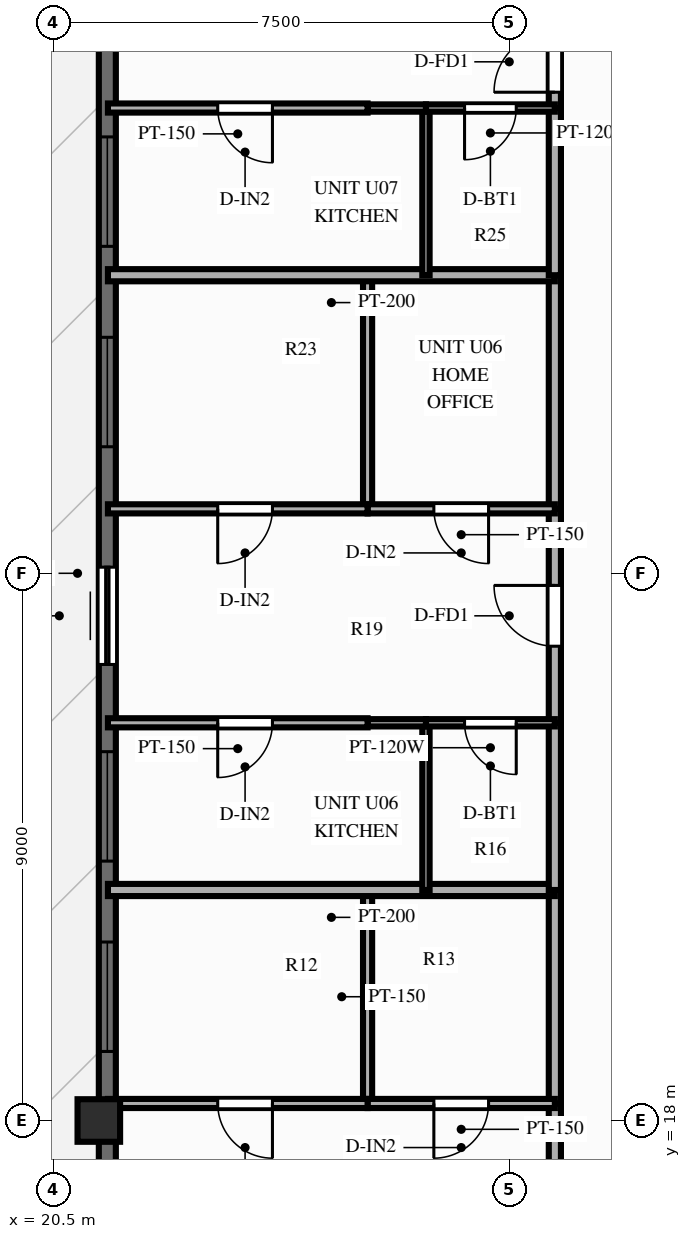
"""IFC4 building model, lengths in metres.
Left out: names, types, materials, properties, quantities, classifications, styles, units other than length and angle.
Written with IfcOpenShell. Run it as: python <this file> out.ifc"""

import sys

from ifc_helpers import new_model, si_unit, direction, frame, frame_2d, origin, origin_2d, place, context, subcontext, project, spatial, rectangle, extrude, source, transform, mapped, element, fill, save


model = new_model("IFC4")
c1 = context("Model", 3, precision=1e-05, world=origin(), true_north=direction((0.0, 1.0)))
c2 = subcontext(c1, "Body", "Model", "MODEL_VIEW")
j1 = project(units=[si_unit("LENGTHUNIT", "METRE"), si_unit("PLANEANGLEUNIT", "RADIAN")], contexts=[c1])
p1 = place(None, origin())
s1 = spatial("IfcSite", under=j1, at=p1, CompositionType="ELEMENT")
p2 = place(p1, origin())
s2 = spatial("IfcBuilding", under=s1, at=p2, CompositionType="ELEMENT")
p3 = place(p2, frame((0.0, 0.0, 226.2)))
s3 = spatial("IfcBuildingStorey", under=s2, at=p3, CompositionType="ELEMENT", Elevation=226.2)
m1 = source(origin(), c2, "Body", "SweptSolid", [
    extrude(rectangle(XDim=0.7, YDim=0.7, at=origin_2d()), origin(), (0.0, 0.0, 1.0), 3.9),
])
p4 = place(p3, frame((21.25, 18.0, 0.0), z_axis=(0.0, 0.0, 1.0), x_axis=(1.0, 0.0, 0.0)))
e1 = element("IfcColumn", 1, at=p4, inside=s3, PredefinedType="COLUMN", context=c2, shape_type="MappedRepresentation", body=[
    mapped(m1, transform((0.0, 0.0, 0.0), scale=1.0)),
])
p5 = place(p3, frame((21.39, 11.5, 0.0), z_axis=(0.0, 0.0, 1.0), x_axis=(0.0, 1.0, 0.0)))
e2 = element("IfcWall", 2, at=p5, inside=s3, PredefinedType="SOLIDWALL", context=c2, shape_type="SweptSolid", body=[
    extrude(rectangle(XDim=31.0, YDim=0.28, at=frame_2d((15.5, 0.0))), origin(), (0.0, 0.0, 1.0), 2.79),
])
p6 = place(p5, frame((0.66, 0.0, 0.85)))
e3 = element("IfcOpeningElement", 3, at=p6, cuts=e2, PredefinedType="OPENING", context=c2, shape_type="SweptSolid", body=[
    extrude(rectangle(XDim=1.8, YDim=1.65, at=frame_2d((0.9, 0.825))), frame((0.0, 0.152, 0.0), z_axis=(0.0, -1.0, 0.0), x_axis=(1.0, 0.0, 0.0)), (0.0, 0.0, 1.0), 0.304),
])
p7 = place(p5, frame((3.72, 0.0, 0.85)))
e4 = element("IfcOpeningElement", 4, at=p7, cuts=e2, PredefinedType="OPENING", context=c2, shape_type="SweptSolid", body=[
    extrude(rectangle(XDim=1.8, YDim=1.65, at=frame_2d((0.9, 0.825))), frame((0.0, 0.152, 0.0), z_axis=(0.0, -1.0, 0.0), x_axis=(1.0, 0.0, 0.0)), (0.0, 0.0, 1.0), 0.304),
])
p8 = place(p5, frame((7.635, 0.0, 0.85)))
e5 = element("IfcOpeningElement", 5, at=p8, cuts=e2, PredefinedType="OPENING", context=c2, shape_type="SweptSolid", body=[
    extrude(rectangle(XDim=1.8, YDim=1.65, at=frame_2d((0.9, 0.825))), frame((0.0, 0.152, 0.0), z_axis=(0.0, -1.0, 0.0), x_axis=(1.0, 0.0, 0.0)), (0.0, 0.0, 1.0), 0.304),
])
p9 = place(p5, frame((10.766, 0.0, 0.85)))
e6 = element("IfcOpeningElement", 6, at=p9, cuts=e2, PredefinedType="OPENING", context=c2, shape_type="SweptSolid", body=[
    extrude(rectangle(XDim=1.8, YDim=1.65, at=frame_2d((0.9, 0.825))), frame((0.0, 0.152, 0.0), z_axis=(0.0, -1.0, 0.0), x_axis=(1.0, 0.0, 0.0)), (0.0, 0.0, 1.0), 0.304),
])
p10 = place(p5, frame((14.0, 0.0, 0.0)))
e7 = element("IfcOpeningElement", 7, at=p10, cuts=e2, PredefinedType="OPENING", context=c2, shape_type="SweptSolid", body=[
    extrude(rectangle(XDim=1.6, YDim=2.15, at=frame_2d((0.8, 1.075))), frame((0.0, 0.152, 0.0), z_axis=(0.0, -1.0, 0.0), x_axis=(1.0, 0.0, 0.0)), (0.0, 0.0, 1.0), 0.304),
])
p11 = place(p5, frame((17.581, 0.0, 0.85)))
e8 = element("IfcOpeningElement", 8, at=p11, cuts=e2, PredefinedType="OPENING", context=c2, shape_type="SweptSolid", body=[
    extrude(rectangle(XDim=1.8, YDim=1.65, at=frame_2d((0.9, 0.825))), frame((0.0, 0.152, 0.0), z_axis=(0.0, -1.0, 0.0), x_axis=(1.0, 0.0, 0.0)), (0.0, 0.0, 1.0), 0.304),
])
p12 = place(p5, frame((20.877, 0.0, 0.85)))
e9 = element("IfcOpeningElement", 9, at=p12, cuts=e2, PredefinedType="OPENING", context=c2, shape_type="SweptSolid", body=[
    extrude(rectangle(XDim=1.8, YDim=1.65, at=frame_2d((0.9, 0.825))), frame((0.0, 0.152, 0.0), z_axis=(0.0, -1.0, 0.0), x_axis=(1.0, 0.0, 0.0)), (0.0, 0.0, 1.0), 0.304),
])
p13 = place(p5, frame((25.176, 0.0, 0.85)))
e10 = element("IfcOpeningElement", 10, at=p13, cuts=e2, PredefinedType="OPENING", context=c2, shape_type="SweptSolid", body=[
    extrude(rectangle(XDim=1.2, YDim=1.5, at=frame_2d((0.6, 0.75))), frame((0.0, 0.152, 0.0), z_axis=(0.0, -1.0, 0.0), x_axis=(1.0, 0.0, 0.0)), (0.0, 0.0, 1.0), 0.304),
])
p14 = place(p5, frame((27.936, 0.0, 0.85)))
e11 = element("IfcOpeningElement", 11, at=p14, cuts=e2, PredefinedType="OPENING", context=c2, shape_type="SweptSolid", body=[
    extrude(rectangle(XDim=1.8, YDim=1.65, at=frame_2d((0.9, 0.825))), frame((0.0, 0.152, 0.0), z_axis=(0.0, -1.0, 0.0), x_axis=(1.0, 0.0, 0.0)), (0.0, 0.0, 1.0), 0.304),
])
p15 = place(p3, frame((28.75, 14.43, 0.0), z_axis=(0.0, 0.0, 1.0), x_axis=(0.0, 1.0, 0.0)))
e12 = element("IfcWall", 12, at=p15, inside=s3, PredefinedType="PARTITIONING", context=c2, shape_type="SweptSolid", body=[
    extrude(rectangle(XDim=3.85, YDim=0.2, at=frame_2d((1.925, 0.0))), origin(), (0.0, 0.0, 1.0), 3.69),
])
p16 = place(p15, frame((1.425, 0.0, 0.0)))
e13 = element("IfcOpeningElement", 13, at=p16, cuts=e12, PredefinedType="OPENING", context=c2, shape_type="SweptSolid", body=[
    extrude(rectangle(XDim=1.0, YDim=2.15, at=frame_2d((0.5, 1.075))), frame((0.0, 0.112, 0.0), z_axis=(0.0, -1.0, 0.0), x_axis=(1.0, 0.0, 0.0)), (0.0, 0.0, 1.0), 0.224),
])
p17 = place(p3, frame((28.75, 18.28, 0.0), z_axis=(0.0, 0.0, 1.0), x_axis=(0.0, 1.0, 0.0)))
e14 = element("IfcWall", 14, at=p17, inside=s3, PredefinedType="PARTITIONING", context=c2, shape_type="SweptSolid", body=[
    extrude(rectangle(XDim=3.511, YDim=0.2, at=frame_2d((1.756, 0.0))), origin(), (0.0, 0.0, 1.0), 3.69),
])
p18 = place(p3, frame((25.67, 18.28, 0.0), z_axis=(0.0, 0.0, 1.0), x_axis=(0.0, 1.0, 0.0)))
e15 = element("IfcWall", 15, at=p18, inside=s3, PredefinedType="PARTITIONING", context=c2, shape_type="SweptSolid", body=[
    extrude(rectangle(XDim=3.511, YDim=0.15, at=frame_2d((1.756, 0.0))), origin(), (0.0, 0.0, 1.0), 3.39),
])
p19 = place(p3, frame((28.75, 18.28, 0.0), z_axis=(0.0, 0.0, 1.0), x_axis=(-1.0, 0.0, 0.0)))
e16 = element("IfcWall", 16, at=p19, inside=s3, PredefinedType="PARTITIONING", context=c2, shape_type="SweptSolid", body=[
    extrude(rectangle(XDim=3.08, YDim=0.15, at=frame_2d((1.54, 0.0))), origin(), (0.0, 0.0, 1.0), 3.69),
])
p20 = place(p19, frame((1.09, 0.0, 0.0)))
e17 = element("IfcOpeningElement", 17, at=p20, cuts=e16, PredefinedType="OPENING", context=c2, shape_type="SweptSolid", body=[
    extrude(rectangle(XDim=0.9, YDim=2.1, at=frame_2d((0.45, 1.05))), frame((0.0, 0.087, 0.0), z_axis=(0.0, -1.0, 0.0), x_axis=(1.0, 0.0, 0.0)), (0.0, 0.0, 1.0), 0.174),
])
p21 = place(p3, frame((25.67, 18.28, 0.0), z_axis=(0.0, 0.0, 1.0), x_axis=(-1.0, 0.0, 0.0)))
e18 = element("IfcWall", 18, at=p21, inside=s3, PredefinedType="PARTITIONING", context=c2, shape_type="SweptSolid", body=[
    extrude(rectangle(XDim=4.27, YDim=0.15, at=frame_2d((2.135, 0.0))), origin(), (0.0, 0.0, 1.0), 3.69),
])
p22 = place(p21, frame((1.565, 0.0, 0.0)))
e19 = element("IfcOpeningElement", 19, at=p22, cuts=e18, PredefinedType="OPENING", context=c2, shape_type="SweptSolid", body=[
    extrude(rectangle(XDim=0.9, YDim=2.1, at=frame_2d((0.45, 1.05))), frame((0.0, 0.087, 0.0), z_axis=(0.0, -1.0, 0.0), x_axis=(1.0, 0.0, 0.0)), (0.0, 0.0, 1.0), 0.174),
])
p23 = place(p3, frame((28.75, 21.791, 0.0), z_axis=(0.0, 0.0, 1.0), x_axis=(-1.0, 0.0, 0.0)))
e20 = element("IfcWall", 20, at=p23, inside=s3, PredefinedType="PARTITIONING", context=c2, shape_type="SweptSolid", body=[
    extrude(rectangle(XDim=7.35, YDim=0.2, at=frame_2d((3.675, 0.0))), origin(), (0.0, 0.0, 1.0), 3.29),
])
p24 = place(p3, frame((28.75, 21.791, 0.0), z_axis=(0.0, 0.0, 1.0), x_axis=(0.0, 1.0, 0.0)))
e21 = element("IfcWall", 21, at=p24, inside=s3, PredefinedType="PARTITIONING", context=c2, shape_type="SweptSolid", body=[
    extrude(rectangle(XDim=2.75, YDim=0.2, at=frame_2d((1.375, 0.0))), origin(), (0.0, 0.0, 1.0), 3.69),
])
p25 = place(p3, frame((28.75, 24.541, 0.0), z_axis=(0.0, 0.0, 1.0), x_axis=(0.0, 1.0, 0.0)))
e22 = element("IfcWall", 22, at=p25, inside=s3, PredefinedType="PARTITIONING", context=c2, shape_type="SweptSolid", body=[
    extrude(rectangle(XDim=3.519, YDim=0.2, at=frame_2d((1.759, 0.0))), origin(), (0.0, 0.0, 1.0), 3.69),
])
p26 = place(p25, frame((1.26, 0.0, 0.0)))
e23 = element("IfcOpeningElement", 23, at=p26, cuts=e22, PredefinedType="OPENING", context=c2, shape_type="SweptSolid", body=[
    extrude(rectangle(XDim=1.0, YDim=2.15, at=frame_2d((0.5, 1.075))), frame((0.0, 0.112, 0.0), z_axis=(0.0, -1.0, 0.0), x_axis=(1.0, 0.0, 0.0)), (0.0, 0.0, 1.0), 0.224),
])
p27 = place(p3, frame((28.75, 28.06, 0.0), z_axis=(0.0, 0.0, 1.0), x_axis=(0.0, 1.0, 0.0)))
e24 = element("IfcWall", 24, at=p27, inside=s3, PredefinedType="PARTITIONING", context=c2, shape_type="SweptSolid", body=[
    extrude(rectangle(XDim=3.842, YDim=0.2, at=frame_2d((1.921, 0.0))), origin(), (0.0, 0.0, 1.0), 3.69),
])
p28 = place(p3, frame((26.63, 21.791, 0.0), z_axis=(0.0, 0.0, 1.0), x_axis=(0.0, 1.0, 0.0)))
e25 = element("IfcWall", 25, at=p28, inside=s3, PredefinedType="PARTITIONING", context=c2, shape_type="SweptSolid", body=[
    extrude(rectangle(XDim=2.75, YDim=0.12, at=frame_2d((1.375, 0.0))), origin(), (0.0, 0.0, 1.0), 3.39),
])
p29 = place(p3, frame((25.67, 28.06, 0.0), z_axis=(0.0, 0.0, 1.0), x_axis=(0.0, 1.0, 0.0)))
e26 = element("IfcWall", 26, at=p29, inside=s3, PredefinedType="PARTITIONING", context=c2, shape_type="SweptSolid", body=[
    extrude(rectangle(XDim=3.842, YDim=0.15, at=frame_2d((1.921, 0.0))), origin(), (0.0, 0.0, 1.0), 3.39),
])
p30 = place(p3, frame((28.75, 24.541, 0.0), z_axis=(0.0, 0.0, 1.0), x_axis=(-1.0, 0.0, 0.0)))
e27 = element("IfcWall", 27, at=p30, inside=s3, PredefinedType="PARTITIONING", context=c2, shape_type="SweptSolid", body=[
    extrude(rectangle(XDim=2.12, YDim=0.12, at=frame_2d((1.06, 0.0))), origin(), (0.0, 0.0, 1.0), 3.69),
])
p31 = place(p30, frame((0.635, 0.0, 0.0)))
e28 = element("IfcOpeningElement", 28, at=p31, cuts=e27, PredefinedType="OPENING", context=c2, shape_type="SweptSolid", body=[
    extrude(rectangle(XDim=0.85, YDim=2.05, at=frame_2d((0.425, 1.025))), frame((0.0, 0.072, 0.0), z_axis=(0.0, -1.0, 0.0), x_axis=(1.0, 0.0, 0.0)), (0.0, 0.0, 1.0), 0.144),
])
p32 = place(p3, frame((26.63, 24.541, 0.0), z_axis=(0.0, 0.0, 1.0), x_axis=(-1.0, 0.0, 0.0)))
e29 = element("IfcWall", 29, at=p32, inside=s3, PredefinedType="PARTITIONING", context=c2, shape_type="SweptSolid", body=[
    extrude(rectangle(XDim=0.96, YDim=0.12, at=frame_2d((0.48, 0.0))), origin(), (0.0, 0.0, 1.0), 3.69),
])
p33 = place(p3, frame((25.67, 24.541, 0.0), z_axis=(0.0, 0.0, 1.0), x_axis=(-1.0, 0.0, 0.0)))
e30 = element("IfcWall", 30, at=p33, inside=s3, PredefinedType="PARTITIONING", context=c2, shape_type="SweptSolid", body=[
    extrude(rectangle(XDim=4.27, YDim=0.15, at=frame_2d((2.135, 0.0))), origin(), (0.0, 0.0, 1.0), 3.69),
])
p34 = place(p33, frame((1.565, 0.0, 0.0)))
e31 = element("IfcOpeningElement", 31, at=p34, cuts=e30, PredefinedType="OPENING", context=c2, shape_type="SweptSolid", body=[
    extrude(rectangle(XDim=0.9, YDim=2.1, at=frame_2d((0.45, 1.05))), frame((0.0, 0.087, 0.0), z_axis=(0.0, -1.0, 0.0), x_axis=(1.0, 0.0, 0.0)), (0.0, 0.0, 1.0), 0.174),
])
p35 = place(p3, frame((28.75, 28.06, 0.0), z_axis=(0.0, 0.0, 1.0), x_axis=(-1.0, 0.0, 0.0)))
e32 = element("IfcWall", 32, at=p35, inside=s3, PredefinedType="PARTITIONING", context=c2, shape_type="SweptSolid", body=[
    extrude(rectangle(XDim=3.08, YDim=0.15, at=frame_2d((1.54, 0.0))), origin(), (0.0, 0.0, 1.0), 3.69),
])
p36 = place(p35, frame((1.09, 0.0, 0.0)))
e33 = element("IfcOpeningElement", 33, at=p36, cuts=e32, PredefinedType="OPENING", context=c2, shape_type="SweptSolid", body=[
    extrude(rectangle(XDim=0.9, YDim=2.1, at=frame_2d((0.45, 1.05))), frame((0.0, 0.087, 0.0), z_axis=(0.0, -1.0, 0.0), x_axis=(1.0, 0.0, 0.0)), (0.0, 0.0, 1.0), 0.174),
])
p37 = place(p3, frame((25.67, 28.06, 0.0), z_axis=(0.0, 0.0, 1.0), x_axis=(-1.0, 0.0, 0.0)))
e34 = element("IfcWall", 34, at=p37, inside=s3, PredefinedType="PARTITIONING", context=c2, shape_type="SweptSolid", body=[
    extrude(rectangle(XDim=4.27, YDim=0.15, at=frame_2d((2.135, 0.0))), origin(), (0.0, 0.0, 1.0), 3.69),
])
p38 = place(p37, frame((1.565, 0.0, 0.0)))
e35 = element("IfcOpeningElement", 35, at=p38, cuts=e34, PredefinedType="OPENING", context=c2, shape_type="SweptSolid", body=[
    extrude(rectangle(XDim=0.9, YDim=2.1, at=frame_2d((0.45, 1.05))), frame((0.0, 0.087, 0.0), z_axis=(0.0, -1.0, 0.0), x_axis=(1.0, 0.0, 0.0)), (0.0, 0.0, 1.0), 0.174),
])
p39 = place(p3, frame((28.75, 31.902, 0.0), z_axis=(0.0, 0.0, 1.0), x_axis=(-1.0, 0.0, 0.0)))
e36 = element("IfcWall", 36, at=p39, inside=s3, PredefinedType="PARTITIONING", context=c2, shape_type="SweptSolid", body=[
    extrude(rectangle(XDim=7.35, YDim=0.2, at=frame_2d((3.675, 0.0))), origin(), (0.0, 0.0, 1.0), 3.29),
])
p40 = place(p3, frame((28.75, 31.902, 0.0), z_axis=(0.0, 0.0, 1.0), x_axis=(0.0, 1.0, 0.0)))
e37 = element("IfcWall", 37, at=p40, inside=s3, PredefinedType="PARTITIONING", context=c2, shape_type="SweptSolid", body=[
    extrude(rectangle(XDim=2.75, YDim=0.2, at=frame_2d((1.375, 0.0))), origin(), (0.0, 0.0, 1.0), 3.69),
])
p41 = place(p3, frame((28.75, 34.652, 0.0), z_axis=(0.0, 0.0, 1.0), x_axis=(0.0, 1.0, 0.0)))
e38 = element("IfcWall", 38, at=p41, inside=s3, PredefinedType="PARTITIONING", context=c2, shape_type="SweptSolid", body=[
    extrude(rectangle(XDim=3.709, YDim=0.2, at=frame_2d((1.854, 0.0))), origin(), (0.0, 0.0, 1.0), 3.69),
])
p42 = place(p41, frame((0.26, 0.0, 0.0)))
e39 = element("IfcOpeningElement", 39, at=p42, cuts=e38, PredefinedType="OPENING", context=c2, shape_type="SweptSolid", body=[
    extrude(rectangle(XDim=1.0, YDim=2.15, at=frame_2d((0.5, 1.075))), frame((0.0, 0.112, 0.0), z_axis=(0.0, -1.0, 0.0), x_axis=(1.0, 0.0, 0.0)), (0.0, 0.0, 1.0), 0.224),
])
p43 = place(p3, frame((26.63, 31.902, 0.0), z_axis=(0.0, 0.0, 1.0), x_axis=(0.0, 1.0, 0.0)))
e40 = element("IfcWall", 40, at=p43, inside=s3, PredefinedType="PARTITIONING", context=c2, shape_type="SweptSolid", body=[
    extrude(rectangle(XDim=2.75, YDim=0.12, at=frame_2d((1.375, 0.0))), origin(), (0.0, 0.0, 1.0), 3.39),
])
p44 = place(p3, frame((28.75, 34.652, 0.0), z_axis=(0.0, 0.0, 1.0), x_axis=(-1.0, 0.0, 0.0)))
e41 = element("IfcWall", 41, at=p44, inside=s3, PredefinedType="PARTITIONING", context=c2, shape_type="SweptSolid", body=[
    extrude(rectangle(XDim=2.12, YDim=0.12, at=frame_2d((1.06, 0.0))), origin(), (0.0, 0.0, 1.0), 3.69),
])
p45 = place(p44, frame((0.635, 0.0, 0.0)))
e42 = element("IfcOpeningElement", 42, at=p45, cuts=e41, PredefinedType="OPENING", context=c2, shape_type="SweptSolid", body=[
    extrude(rectangle(XDim=0.85, YDim=2.05, at=frame_2d((0.425, 1.025))), frame((0.0, 0.072, 0.0), z_axis=(0.0, -1.0, 0.0), x_axis=(1.0, 0.0, 0.0)), (0.0, 0.0, 1.0), 0.144),
])
p46 = place(p3, frame((26.63, 34.652, 0.0), z_axis=(0.0, 0.0, 1.0), x_axis=(-1.0, 0.0, 0.0)))
e43 = element("IfcWall", 43, at=p46, inside=s3, PredefinedType="PARTITIONING", context=c2, shape_type="SweptSolid", body=[
    extrude(rectangle(XDim=0.96, YDim=0.12, at=frame_2d((0.48, 0.0))), origin(), (0.0, 0.0, 1.0), 3.69),
])
p47 = place(p3, frame((25.67, 34.652, 0.0), z_axis=(0.0, 0.0, 1.0), x_axis=(-1.0, 0.0, 0.0)))
e44 = element("IfcWall", 44, at=p47, inside=s3, PredefinedType="PARTITIONING", context=c2, shape_type="SweptSolid", body=[
    extrude(rectangle(XDim=4.27, YDim=0.15, at=frame_2d((2.135, 0.0))), origin(), (0.0, 0.0, 1.0), 3.69),
])
p48 = place(p47, frame((1.565, 0.0, 0.0)))
e45 = element("IfcOpeningElement", 45, at=p48, cuts=e44, PredefinedType="OPENING", context=c2, shape_type="SweptSolid", body=[
    extrude(rectangle(XDim=0.9, YDim=2.1, at=frame_2d((0.45, 1.05))), frame((0.0, 0.087, 0.0), z_axis=(0.0, -1.0, 0.0), x_axis=(1.0, 0.0, 0.0)), (0.0, 0.0, 1.0), 0.174),
])
m2 = source(origin(), c2, "Body", "SweptSolid", [
    extrude(rectangle(XDim=1.8, YDim=1.65, at=frame_2d((0.9, 0.825))), frame((0.0, 0.03, 0.0), z_axis=(0.0, -1.0, 0.0), x_axis=(1.0, 0.0, 0.0)), (0.0, 0.0, 1.0), 0.06),
])
p49 = place(p8, origin())
e46 = element("IfcWindow", 46, at=p49, inside=s3, PartitioningType="SINGLE_PANEL", PredefinedType="WINDOW", context=c2, shape_type="MappedRepresentation", body=[
    mapped(m2, transform((0.0, 0.0, 0.0), scale=1.0)),
])
fill(e5, e46)
p50 = place(p9, origin())
e47 = element("IfcWindow", 47, at=p50, inside=s3, PartitioningType="SINGLE_PANEL", PredefinedType="WINDOW", context=c2, shape_type="MappedRepresentation", body=[
    mapped(m2, transform((0.0, 0.0, 0.0), scale=1.0)),
])
fill(e6, e47)
m3 = source(origin(), c2, "Body", "SweptSolid", [
    extrude(rectangle(XDim=1.6, YDim=2.15, at=frame_2d((0.8, 1.075))), frame((0.0, 0.025, 0.0), z_axis=(0.0, -1.0, 0.0), x_axis=(1.0, 0.0, 0.0)), (0.0, 0.0, 1.0), 0.05),
])
p51 = place(p10, origin())
e48 = element("IfcDoor", 48, at=p51, inside=s3, OperationType="SLIDING_TO_LEFT", PredefinedType="DOOR", context=c2, shape_type="MappedRepresentation", body=[
    mapped(m3, transform((0.0, 0.0, 0.0), scale=1.0)),
])
fill(e7, e48)
p52 = place(p11, origin())
e49 = element("IfcWindow", 49, at=p52, inside=s3, PartitioningType="SINGLE_PANEL", PredefinedType="WINDOW", context=c2, shape_type="MappedRepresentation", body=[
    mapped(m2, transform((0.0, 0.0, 0.0), scale=1.0)),
])
fill(e8, e49)
p53 = place(p12, origin())
e50 = element("IfcWindow", 50, at=p53, inside=s3, PartitioningType="SINGLE_PANEL", PredefinedType="WINDOW", context=c2, shape_type="MappedRepresentation", body=[
    mapped(m2, transform((0.0, 0.0, 0.0), scale=1.0)),
])
fill(e9, e50)
m4 = source(origin(), c2, "Body", "SweptSolid", [
    extrude(rectangle(XDim=0.9, YDim=2.1, at=frame_2d((0.45, 1.05))), frame((0.0, 0.025, 0.0), z_axis=(0.0, -1.0, 0.0), x_axis=(1.0, 0.0, 0.0)), (0.0, 0.0, 1.0), 0.05),
])
p54 = place(p20, origin())
e51 = element("IfcDoor", 51, at=p54, inside=s3, OperationType="SINGLE_SWING_RIGHT", PredefinedType="DOOR", context=c2, shape_type="MappedRepresentation", body=[
    mapped(m4, transform((0.0, 0.0, 0.0), scale=1.0)),
])
fill(e17, e51)
p55 = place(p22, origin())
e52 = element("IfcDoor", 52, at=p55, inside=s3, OperationType="SINGLE_SWING_LEFT", PredefinedType="DOOR", context=c2, shape_type="MappedRepresentation", body=[
    mapped(m4, transform((0.0, 0.0, 0.0), scale=1.0)),
])
fill(e19, e52)
m5 = source(origin(), c2, "Body", "SweptSolid", [
    extrude(rectangle(XDim=1.0, YDim=2.15, at=frame_2d((0.5, 1.075))), frame((0.0, 0.025, 0.0), z_axis=(0.0, -1.0, 0.0), x_axis=(1.0, 0.0, 0.0)), (0.0, 0.0, 1.0), 0.05),
])
p56 = place(p26, origin())
e53 = element("IfcDoor", 53, at=p56, inside=s3, OperationType="SINGLE_SWING_RIGHT", PredefinedType="DOOR", context=c2, shape_type="MappedRepresentation", body=[
    mapped(m5, transform((0.0, 0.0, 0.0), scale=1.0)),
])
fill(e23, e53)
m6 = source(origin(), c2, "Body", "SweptSolid", [
    extrude(rectangle(XDim=0.85, YDim=2.05, at=frame_2d((0.425, 1.025))), frame((0.0, 0.025, 0.0), z_axis=(0.0, -1.0, 0.0), x_axis=(1.0, 0.0, 0.0)), (0.0, 0.0, 1.0), 0.05),
])
p57 = place(p31, origin())
e54 = element("IfcDoor", 54, at=p57, inside=s3, OperationType="SINGLE_SWING_LEFT", PredefinedType="DOOR", context=c2, shape_type="MappedRepresentation", body=[
    mapped(m6, transform((0.0, 0.0, 0.0), scale=1.0)),
])
fill(e28, e54)
p58 = place(p34, origin())
e55 = element("IfcDoor", 55, at=p58, inside=s3, OperationType="SINGLE_SWING_RIGHT", PredefinedType="DOOR", context=c2, shape_type="MappedRepresentation", body=[
    mapped(m4, transform((0.0, 0.0, 0.0), scale=1.0)),
])
fill(e31, e55)
p59 = place(p36, origin())
e56 = element("IfcDoor", 56, at=p59, inside=s3, OperationType="SINGLE_SWING_LEFT", PredefinedType="DOOR", context=c2, shape_type="MappedRepresentation", body=[
    mapped(m4, transform((0.0, 0.0, 0.0), scale=1.0)),
])
fill(e33, e56)
p60 = place(p38, origin())
e57 = element("IfcDoor", 57, at=p60, inside=s3, OperationType="SINGLE_SWING_RIGHT", PredefinedType="DOOR", context=c2, shape_type="MappedRepresentation", body=[
    mapped(m4, transform((0.0, 0.0, 0.0), scale=1.0)),
])
fill(e35, e57)
p61 = place(p42, origin())
e58 = element("IfcDoor", 58, at=p61, inside=s3, OperationType="SINGLE_SWING_LEFT", PredefinedType="DOOR", context=c2, shape_type="MappedRepresentation", body=[
    mapped(m5, transform((0.0, 0.0, 0.0), scale=1.0)),
])
fill(e39, e58)
p62 = place(p45, origin())
e59 = element("IfcDoor", 59, at=p62, inside=s3, OperationType="SINGLE_SWING_RIGHT", PredefinedType="DOOR", context=c2, shape_type="MappedRepresentation", body=[
    mapped(m6, transform((0.0, 0.0, 0.0), scale=1.0)),
])
fill(e42, e59)
p63 = place(p48, origin())
e60 = element("IfcDoor", 60, at=p63, inside=s3, OperationType="SINGLE_SWING_LEFT", PredefinedType="DOOR", context=c2, shape_type="MappedRepresentation", body=[
    mapped(m4, transform((0.0, 0.0, 0.0), scale=1.0)),
])
fill(e45, e60)
save(model, sys.argv[1])
